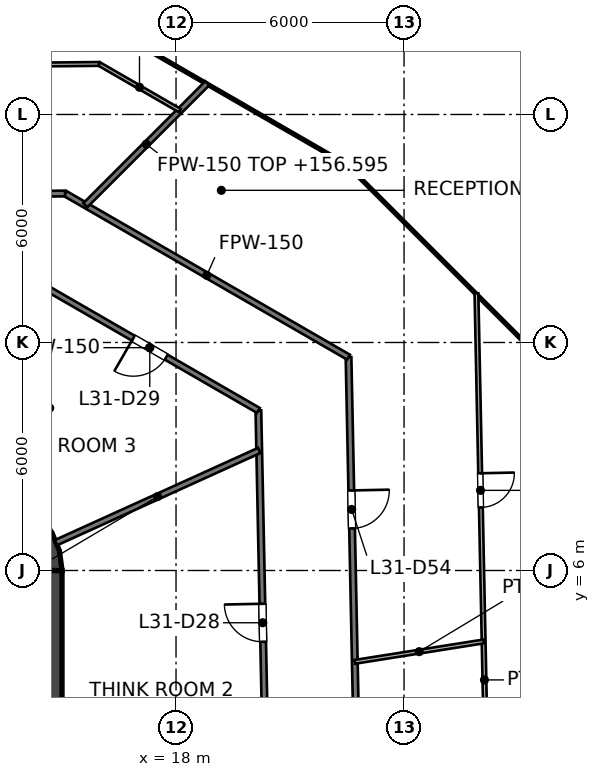
"""IFC4 building model, lengths in metres.
Left out: names, types, materials, properties, quantities, classifications, styles, units other than length and angle.
Written with IfcOpenShell. Run it as: python <this file> out.ifc"""

import sys

from ifc_helpers import new_model, si_unit, direction, frame, frame_2d, origin, place, context, subcontext, project, spatial, polyline, rectangle, outline, extrude, element, fill, save


model = new_model("IFC4")
c1 = context("Model", 3, precision=1e-05, world=origin(), true_north=direction((0.0, 1.0)))
c2 = subcontext(c1, "Body", "Model", "MODEL_VIEW")
j1 = project(units=[si_unit("LENGTHUNIT", "METRE"), si_unit("PLANEANGLEUNIT", "RADIAN")], contexts=[c1])
p1 = place(None, origin())
s1 = spatial("IfcSite", under=j1, at=p1, CompositionType="ELEMENT")
p2 = place(p1, origin())
s2 = spatial("IfcBuilding", under=s1, at=p2, CompositionType="ELEMENT")
p3 = place(p2, frame((0.0, 0.0, 153.6)))
s3 = spatial("IfcBuildingStorey", under=s2, at=p3, CompositionType="ELEMENT", Elevation=153.6)
p4 = place(p3, frame((14.75, -6.0, 0.0), z_axis=(0.0, 0.0, 1.0), x_axis=(0.0, 1.0, 0.0)))
e1 = element("IfcWall", 1, at=p4, inside=s3, PredefinedType="SHEAR", context=c2, shape_type="SweptSolid", body=[
    extrude(rectangle(XDim=12.0, YDim=0.5, at=frame_2d((6.0, 0.0))), origin(), (0.0, 0.0, 1.0), 4.0),
])
p5 = place(p3, origin())
e2 = element("IfcWall", 2, at=p5, inside=s3, PredefinedType="SHEAR", context=c2, shape_type="SweptSolid", body=[
    extrude(outline(polyline([(13.0, 8.0), (13.0, 7.496), (13.387, 7.445), (13.748, 7.295), (14.058, 7.058), (14.295, 6.748), (14.445, 6.387), (14.496, 6.0), (15.0, 6.0), (14.932, 6.518), (14.732, 7.0), (14.414, 7.414), (14.0, 7.732), (13.518, 7.932), (13.0, 8.0)])), origin(), (0.0, 0.0, 1.0), 4.0),
])
p6 = place(p3, frame((20.167, 10.213, 0.0), z_axis=(0.0, 0.0, 1.0), x_axis=(0.020610894613, -0.999787572949, 0.0)))
e3 = element("IfcWall", 3, at=p6, inside=s3, PredefinedType="PARTITIONING", context=c2, shape_type="SweptSolid", body=[
    extrude(rectangle(XDim=17.637, YDim=0.15, at=frame_2d((8.819, 0.0))), origin(), (0.0, 0.0, 1.0), 2.927),
])
p7 = place(p6, frame((10.508, 0.0, 0.0)))
e4 = element("IfcOpeningElement", 4, at=p7, cuts=e3, PredefinedType="OPENING", context=c2, shape_type="SweptSolid", body=[
    extrude(rectangle(XDim=1.0, YDim=2.1, at=frame_2d((0.5, 1.05))), frame((0.0, 0.075, 0.0), z_axis=(0.0, -1.0, 0.0), x_axis=(1.0, 0.0, 0.0)), (0.0, 0.0, 1.0), 0.15),
])
p8 = place(p6, frame((5.09, 0.0, 0.0)))
e5 = element("IfcOpeningElement", 5, at=p8, cuts=e3, PredefinedType="OPENING", context=c2, shape_type="SweptSolid", body=[
    extrude(rectangle(XDim=1.0, YDim=2.1, at=frame_2d((0.5, 1.05))), frame((0.0, 0.075, 0.0), z_axis=(0.0, -1.0, 0.0), x_axis=(1.0, 0.0, 0.0)), (0.0, 0.0, 1.0), 0.15),
])
p9 = place(p3, frame((22.539, 11.615, 0.0), z_axis=(0.0, 0.0, 1.0), x_axis=(0.020601506683, -0.99978776644, 0.0)))
e6 = element("IfcWall", 6, at=p9, inside=s3, PredefinedType="PARTITIONING", context=c2, shape_type="SweptSolid", body=[
    extrude(rectangle(XDim=19.66, YDim=0.15, at=frame_2d((9.83, 0.0))), origin(), (0.0, 0.0, 1.0), 2.927),
])
p10 = place(p9, frame((13.341, 0.0, 0.0)))
e7 = element("IfcOpeningElement", 7, at=p10, cuts=e6, PredefinedType="OPENING", context=c2, shape_type="SweptSolid", body=[
    extrude(rectangle(XDim=1.0, YDim=2.1, at=frame_2d((0.5, 1.05))), frame((0.0, 0.075, 0.0), z_axis=(0.0, -1.0, 0.0), x_axis=(1.0, 0.0, 0.0)), (0.0, 0.0, 1.0), 0.15),
])
p11 = place(p9, frame((3.51, 0.0, 0.0)))
e8 = element("IfcOpeningElement", 8, at=p11, cuts=e6, PredefinedType="OPENING", context=c2, shape_type="SweptSolid", body=[
    extrude(rectangle(XDim=1.0, YDim=2.1, at=frame_2d((0.5, 1.05))), frame((0.0, 0.075, 0.0), z_axis=(0.0, -1.0, 0.0), x_axis=(1.0, 0.0, 0.0)), (0.0, 0.0, 1.0), 0.15),
])
p12 = place(p3, frame((14.448, 13.515, 0.0), z_axis=(0.0, 0.0, 1.0), x_axis=(0.865975016585, -0.500087263036, 0.0)))
e9 = element("IfcWall", 9, at=p12, inside=s3, PredefinedType="PARTITIONING", context=c2, shape_type="SweptSolid", body=[
    extrude(rectangle(XDim=6.604, YDim=0.15, at=frame_2d((3.302, 0.0))), origin(), (0.0, 0.0, 1.0), 2.927),
])
p13 = place(p12, frame((2.804, 0.0, 0.0)))
e10 = element("IfcOpeningElement", 10, at=p13, cuts=e9, PredefinedType="OPENING", context=c2, shape_type="SweptSolid", body=[
    extrude(rectangle(XDim=1.0, YDim=2.1, at=frame_2d((0.5, 1.05))), frame((0.0, 0.075, 0.0), z_axis=(0.0, -1.0, 0.0), x_axis=(1.0, 0.0, 0.0)), (0.0, 0.0, 1.0), 0.15),
])
p14 = place(p3, frame((15.08, 15.921, 0.0), z_axis=(0.0, 0.0, 1.0), x_axis=(0.865982112089, -0.50007497592, 0.0)))
e11 = element("IfcWall", 11, at=p14, inside=s3, PredefinedType="PARTITIONING", context=c2, shape_type="SweptSolid", body=[
    extrude(rectangle(XDim=8.613, YDim=0.15, at=frame_2d((4.306, 0.0))), origin(), (0.0, 0.0, 1.0), 2.927),
])
p15 = place(p3, frame((-18.587, 15.587, 0.0), z_axis=(0.0, 0.0, 1.0), x_axis=(0.99995087003, 0.009912493396, 0.0)))
e12 = element("IfcWall", 12, at=p15, inside=s3, PredefinedType="PARTITIONING", context=c2, shape_type="SweptSolid", body=[
    extrude(rectangle(XDim=33.669, YDim=0.15, at=frame_2d((16.834, 0.0))), origin(), (0.0, 0.0, 1.0), 2.927),
])
p16 = place(p15, frame((29.033, 0.0, 0.0)))
e13 = element("IfcOpeningElement", 13, at=p16, cuts=e12, PredefinedType="OPENING", context=c2, shape_type="SweptSolid", body=[
    extrude(rectangle(XDim=1.0, YDim=2.1, at=frame_2d((0.5, 1.05))), frame((0.0, 0.075, 0.0), z_axis=(0.0, -1.0, 0.0), x_axis=(1.0, 0.0, 0.0)), (0.0, 0.0, 1.0), 0.15),
])
p17 = place(p15, frame((21.787, 0.0, 0.0)))
e14 = element("IfcOpeningElement", 14, at=p17, cuts=e12, PredefinedType="OPENING", context=c2, shape_type="SweptSolid", body=[
    extrude(rectangle(XDim=1.0, YDim=2.1, at=frame_2d((0.5, 1.05))), frame((0.0, 0.075, 0.0), z_axis=(0.0, -1.0, 0.0), x_axis=(1.0, 0.0, 0.0)), (0.0, 0.0, 1.0), 0.15),
])
p18 = place(p15, frame((16.335, 0.0, 0.0)))
e15 = element("IfcOpeningElement", 15, at=p18, cuts=e12, PredefinedType="OPENING", context=c2, shape_type="SweptSolid", body=[
    extrude(rectangle(XDim=1.0, YDim=2.1, at=frame_2d((0.5, 1.05))), frame((0.0, 0.075, 0.0), z_axis=(0.0, -1.0, 0.0), x_axis=(1.0, 0.0, 0.0)), (0.0, 0.0, 1.0), 0.15),
])
p19 = place(p15, frame((4.217, 0.0, 0.0)))
e16 = element("IfcOpeningElement", 16, at=p19, cuts=e12, PredefinedType="OPENING", context=c2, shape_type="SweptSolid", body=[
    extrude(rectangle(XDim=1.0, YDim=2.1, at=frame_2d((0.5, 1.05))), frame((0.0, 0.075, 0.0), z_axis=(0.0, -1.0, 0.0), x_axis=(1.0, 0.0, 0.0)), (0.0, 0.0, 1.0), 0.15),
])
p20 = place(p3, frame((14.843, 6.733, 0.0), z_axis=(0.0, 0.0, 1.0), x_axis=(0.910628361306, 0.413226315214, 0.0)))
e17 = element("IfcWall", 17, at=p20, inside=s3, PredefinedType="PARTITIONING", context=c2, shape_type="SweptSolid", body=[
    extrude(rectangle(XDim=5.87, YDim=0.15, at=frame_2d((2.935, 0.0))), origin(), (0.0, 0.0, 1.0), 3.85),
])
p21 = place(p3, frame((15.613, 15.613, 0.0), z_axis=(0.0, 0.0, 1.0), x_axis=(0.707106781187, 0.707106781187, 0.0)))
e18 = element("IfcWall", 18, at=p21, inside=s3, PredefinedType="PARTITIONING", context=c2, shape_type="SweptSolid", body=[
    extrude(rectangle(XDim=4.538, YDim=0.15, at=frame_2d((2.269, 0.0))), origin(), (0.0, 0.0, 1.0), 2.995),
])
p22 = place(p3, frame((25.905, 13.295, 0.0), z_axis=(0.0, 0.0, 1.0), x_axis=(0.020631727872, -0.999787143249, 0.0)))
e19 = element("IfcWall", 19, at=p22, inside=s3, PredefinedType="PARTITIONING", context=c2, shape_type="SweptSolid", body=[
    extrude(rectangle(XDim=20.353, YDim=0.1, at=frame_2d((10.177, 0.0))), origin(), (0.0, 0.0, 1.0), 2.927),
])
p23 = place(p22, frame((4.737, 0.0, 0.0)))
e20 = element("IfcOpeningElement", 20, at=p23, cuts=e19, PredefinedType="OPENING", context=c2, shape_type="SweptSolid", body=[
    extrude(rectangle(XDim=0.9, YDim=2.1, at=frame_2d((0.45, 1.05))), frame((0.0, 0.05, 0.0), z_axis=(0.0, -1.0, 0.0), x_axis=(1.0, 0.0, 0.0)), (0.0, 0.0, 1.0), 0.1),
])
p24 = place(p3, frame((15.975, 19.33, 0.0), z_axis=(0.0, 0.0, 1.0), x_axis=(0.865977001312, -0.500083826171, 0.0)))
e21 = element("IfcWall", 21, at=p24, inside=s3, PredefinedType="PARTITIONING", context=c2, shape_type="SweptSolid", body=[
    extrude(rectangle(XDim=2.456, YDim=0.1, at=frame_2d((1.228, 0.0))), origin(), (0.0, 0.0, 1.0), 2.995),
])
p25 = place(p3, frame((-11.006, 19.063, 0.0), z_axis=(0.0, 0.0, 1.0), x_axis=(0.999951007424, 0.009898623735, 0.0)))
e22 = element("IfcWall", 22, at=p25, inside=s3, PredefinedType="PARTITIONING", context=c2, shape_type="SweptSolid", body=[
    extrude(rectangle(XDim=26.982, YDim=0.1, at=frame_2d((13.491, 0.0))), origin(), (0.0, 0.0, 1.0), 2.927),
])
p26 = place(p25, frame((5.412, 0.0, 0.0)))
e23 = element("IfcOpeningElement", 23, at=p26, cuts=e22, PredefinedType="OPENING", context=c2, shape_type="SweptSolid", body=[
    extrude(rectangle(XDim=0.9, YDim=2.1, at=frame_2d((0.45, 1.05))), frame((0.0, 0.05, 0.0), z_axis=(0.0, -1.0, 0.0), x_axis=(1.0, 0.0, 0.0)), (0.0, 0.0, 1.0), 0.1),
])
p27 = place(p3, frame((22.704, 3.596, 0.0), z_axis=(0.0, 0.0, 1.0), x_axis=(0.987679194201, 0.156492202178, 0.0)))
e24 = element("IfcWall", 24, at=p27, inside=s3, PredefinedType="PARTITIONING", context=c2, shape_type="SweptSolid", body=[
    extrude(rectangle(XDim=3.432, YDim=0.1, at=frame_2d((1.716, 0.0))), origin(), (0.0, 0.0, 1.0), 2.995),
])
p28 = place(p8, origin())
e25 = element("IfcDoor", 25, at=p28, inside=s3, OperationType="SINGLE_SWING_LEFT", PredefinedType="DOOR", context=c2, shape_type="SweptSolid", body=[
    extrude(rectangle(XDim=1.0, YDim=2.1, at=frame_2d((0.5, 1.05))), frame((0.0, 0.025, 0.0), z_axis=(0.0, -1.0, 0.0), x_axis=(1.0, 0.0, 0.0)), (0.0, 0.0, 1.0), 0.05),
])
fill(e5, e25)
p29 = place(p13, origin())
e26 = element("IfcDoor", 26, at=p29, inside=s3, OperationType="SINGLE_SWING_LEFT", PredefinedType="DOOR", context=c2, shape_type="SweptSolid", body=[
    extrude(rectangle(XDim=1.0, YDim=2.1, at=frame_2d((0.5, 1.05))), frame((0.0, 0.025, 0.0), z_axis=(0.0, -1.0, 0.0), x_axis=(1.0, 0.0, 0.0)), (0.0, 0.0, 1.0), 0.05),
])
fill(e10, e26)
p30 = place(p11, origin())
e27 = element("IfcDoor", 27, at=p30, inside=s3, OperationType="SINGLE_SWING_LEFT", PredefinedType="DOOR", context=c2, shape_type="SweptSolid", body=[
    extrude(rectangle(XDim=1.0, YDim=2.1, at=frame_2d((0.5, 1.05))), frame((0.0, 0.025, 0.0), z_axis=(0.0, -1.0, 0.0), x_axis=(1.0, 0.0, 0.0)), (0.0, 0.0, 1.0), 0.05),
])
fill(e8, e27)
p31 = place(p23, origin())
e28 = element("IfcDoor", 28, at=p31, inside=s3, OperationType="SINGLE_SWING_LEFT", PredefinedType="DOOR", context=c2, shape_type="SweptSolid", body=[
    extrude(rectangle(XDim=0.9, YDim=2.1, at=frame_2d((0.45, 1.05))), frame((0.0, 0.025, 0.0), z_axis=(0.0, -1.0, 0.0), x_axis=(1.0, 0.0, 0.0)), (0.0, 0.0, 1.0), 0.05),
])
fill(e20, e28)
save(model, sys.argv[1])
